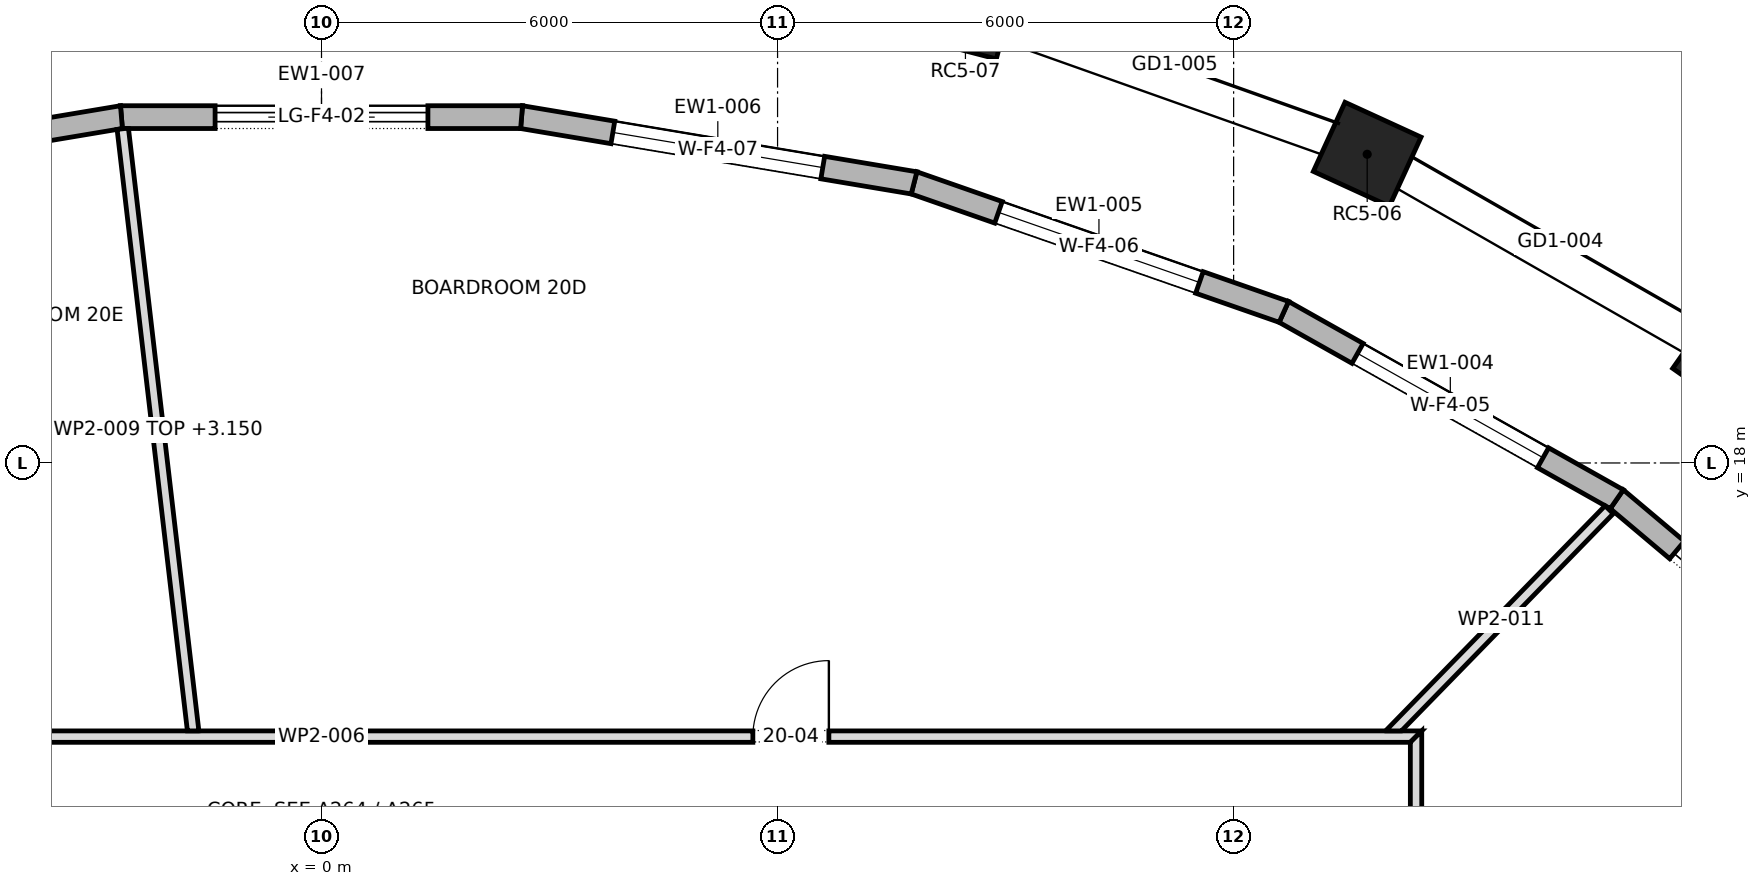
"""IFC4 building model, lengths in metres.
Left out: names, types, materials, properties, quantities, classifications, styles, units other than length and angle.
Written with IfcOpenShell. Run it as: python <this file> out.ifc"""

import sys

from ifc_helpers import new_model, si_unit, direction, frame, frame_2d, origin, origin_2d, place, context, subcontext, project, spatial, polyline, rectangle, outline, extrude, element, fill, save


model = new_model("IFC4")
c1 = context("Model", 3, precision=1e-05, world=origin(), true_north=direction((0.0, 1.0)))
c2 = subcontext(c1, "Body", "Model", "MODEL_VIEW")
j1 = project(units=[si_unit("LENGTHUNIT", "METRE"), si_unit("PLANEANGLEUNIT", "RADIAN")], contexts=[c1])
p1 = place(None, origin())
s1 = spatial("IfcSite", under=j1, at=p1, CompositionType="ELEMENT")
p2 = place(p1, origin())
s2 = spatial("IfcBuilding", under=s1, at=p2, CompositionType="ELEMENT")
p3 = place(p2, frame((0.0, 0.0, 288.3)))
s3 = spatial("IfcBuildingStorey", under=s2, at=p3, CompositionType="ELEMENT", Elevation=288.3)
for number, where, z_axis, x_axis in (
    (1, (18.514, 19.337, 0.0), (0.0, 0.0, 1.0), (-0.818, 0.575, 0.0)),
    (2, (13.757, 22.061, 0.0), (0.0, 0.0, 1.0), (-0.909, 0.417, 0.0)),
    (3, (8.472, 23.938, 0.0), (0.0, 0.0, 1.0), (-0.968, 0.252, 0.0)),
):
    element("IfcColumn", number, at=place(p3, frame(where, z_axis=z_axis, x_axis=x_axis)), inside=s3, PredefinedType="COLUMN", context=c2, shape_type="SweptSolid", body=[
        extrude(rectangle(XDim=1.1, YDim=1.0, at=origin_2d()), origin(), (0.0, 0.0, 1.0), 4.0),
    ])
p4 = place(p3, frame((20.768, 14.384, 0.0), z_axis=(0.0, 0.0, 1.0), x_axis=(-0.764876116592, 0.644177402792, 0.0)))
e4 = element("IfcWall", 4, at=p4, inside=s3, PredefinedType="STANDARD", context=c2, shape_type="SweptSolid", body=[
    extrude(outline(polyline([(-0.015, -0.15), (4.887, -0.15), (4.859, 0.15), (0.015, 0.15), (-0.015, -0.15)])), origin(), (0.0, 0.0, 1.0), 3.7),
])
p5 = place(p4, frame((1.036, 0.0, 0.0)))
e5 = element("IfcOpeningElement", 5, at=p5, cuts=e4, PredefinedType="OPENING", context=c2, shape_type="SweptSolid", body=[
    extrude(rectangle(XDim=2.8, YDim=3.25, at=frame_2d((1.4, 1.625))), frame((0.0, 0.162, 0.0), z_axis=(0.0, -1.0, 0.0), x_axis=(1.0, 0.0, 0.0)), (0.0, 0.0, 1.0), 0.324),
])
p6 = place(p3, frame((17.041, 17.523, 0.0), z_axis=(0.0, 0.0, 1.0), x_axis=(-0.871488606878, 0.490415750239, 0.0)))
e6 = element("IfcWall", 6, at=p6, inside=s3, PredefinedType="STANDARD", context=c2, shape_type="SweptSolid", body=[
    extrude(outline(polyline([(-0.014, -0.15), (5.039, -0.15), (5.013, 0.15), (0.014, 0.15), (-0.014, -0.15)])), origin(), (0.0, 0.0, 1.0), 3.7),
])
p7 = place(p6, frame((1.113, 0.0, 0.6)))
e7 = element("IfcOpeningElement", 7, at=p7, cuts=e6, PredefinedType="OPENING", context=c2, shape_type="SweptSolid", body=[
    extrude(rectangle(XDim=2.8, YDim=2.65, at=frame_2d((1.4, 1.325))), frame((0.0, 0.162, 0.0), z_axis=(0.0, -1.0, 0.0), x_axis=(1.0, 0.0, 0.0)), (0.0, 0.0, 1.0), 0.324),
])
p8 = place(p3, frame((12.661, 19.988, 0.0), z_axis=(0.0, 0.0, 1.0), x_axis=(-0.944204293701, 0.329360367617, 0.0)))
e8 = element("IfcWall", 8, at=p8, inside=s3, PredefinedType="STANDARD", context=c2, shape_type="SweptSolid", body=[
    extrude(outline(polyline([(-0.013, -0.15), (5.165, -0.15), (5.14, 0.15), (0.013, 0.15), (-0.013, -0.15)])), origin(), (0.0, 0.0, 1.0), 3.7),
])
p9 = place(p8, frame((1.176, 0.0, 0.6)))
e9 = element("IfcOpeningElement", 9, at=p9, cuts=e8, PredefinedType="OPENING", context=c2, shape_type="SweptSolid", body=[
    extrude(rectangle(XDim=2.8, YDim=2.65, at=frame_2d((1.4, 1.325))), frame((0.0, 0.162, 0.0), z_axis=(0.0, -1.0, 0.0), x_axis=(1.0, 0.0, 0.0)), (0.0, 0.0, 1.0), 0.324),
])
p10 = place(p3, frame((7.796, 21.685, 0.0), z_axis=(0.0, 0.0, 1.0), x_axis=(-0.986257472007, 0.165215613396, 0.0)))
e10 = element("IfcWall", 10, at=p10, inside=s3, PredefinedType="STANDARD", context=c2, shape_type="SweptSolid", body=[
    extrude(outline(polyline([(-0.013, -0.15), (5.248, -0.15), (5.223, 0.15), (0.013, 0.15), (-0.013, -0.15)])), origin(), (0.0, 0.0, 1.0), 3.7),
])
p11 = place(p10, frame((1.218, 0.0, 0.6)))
e11 = element("IfcOpeningElement", 11, at=p11, cuts=e10, PredefinedType="OPENING", context=c2, shape_type="SweptSolid", body=[
    extrude(rectangle(XDim=2.8, YDim=2.65, at=frame_2d((1.4, 1.325))), frame((0.0, 0.162, 0.0), z_axis=(0.0, -1.0, 0.0), x_axis=(1.0, 0.0, 0.0)), (0.0, 0.0, 1.0), 0.324),
])
p12 = place(p3, frame((2.632, 22.55, 0.0), z_axis=(0.0, 0.0, 1.0), x_axis=(-1.0, 0.0, 0.0)))
e12 = element("IfcWall", 12, at=p12, inside=s3, PredefinedType="STANDARD", context=c2, shape_type="SweptSolid", body=[
    extrude(outline(polyline([(-0.012, -0.15), (5.277, -0.15), (5.252, 0.15), (0.012, 0.15), (-0.012, -0.15)])), origin(), (0.0, 0.0, 1.0), 3.7),
])
p13 = place(p12, frame((1.232, 0.0, 0.0)))
e13 = element("IfcOpeningElement", 13, at=p13, cuts=e12, PredefinedType="OPENING", context=c2, shape_type="SweptSolid", body=[
    extrude(rectangle(XDim=2.8, YDim=3.25, at=frame_2d((1.4, 1.625))), frame((0.0, 0.162, 0.0), z_axis=(0.0, -1.0, 0.0), x_axis=(1.0, 0.0, 0.0)), (0.0, 0.0, 1.0), 0.324),
])
p14 = place(p3, frame((-2.632, 22.55, 0.0), z_axis=(0.0, 0.0, 1.0), x_axis=(-0.986257472007, -0.165215613396, 0.0)))
e14 = element("IfcWall", 14, at=p14, inside=s3, PredefinedType="STANDARD", context=c2, shape_type="SweptSolid", body=[
    extrude(outline(polyline([(-0.012, -0.15), (5.248, -0.15), (5.223, 0.15), (0.012, 0.15), (-0.012, -0.15)])), origin(), (0.0, 0.0, 1.0), 3.7),
])
p15 = place(p14, frame((1.218, 0.0, 0.6)))
e15 = element("IfcOpeningElement", 15, at=p15, cuts=e14, PredefinedType="OPENING", context=c2, shape_type="SweptSolid", body=[
    extrude(rectangle(XDim=2.8, YDim=2.65, at=frame_2d((1.4, 1.325))), frame((0.0, 0.162, 0.0), z_axis=(0.0, -1.0, 0.0), x_axis=(1.0, 0.0, 0.0)), (0.0, 0.0, 1.0), 0.324),
])
p16 = place(p3, frame((-14.475, 14.4, 0.0), z_axis=(0.0, 0.0, 1.0), x_axis=(1.0, 0.0, 0.0)))
e16 = element("IfcWall", 16, at=p16, inside=s3, PredefinedType="PARTITIONING", context=c2, shape_type="SweptSolid", body=[
    extrude(outline(polyline([(0.15, -0.075), (2.06, -0.075), (3.97, -0.075), (5.88, -0.075), (7.79, -0.075), (9.7, -0.075), (11.61, -0.075), (13.52, -0.075), (15.43, -0.075), (17.34, -0.075), (19.25, -0.075), (21.16, -0.075), (23.07, -0.075), (24.98, -0.075), (26.89, -0.075), (28.8, -0.075), (28.95, 0.075), (27.02, 0.075), (25.09, 0.075), (23.16, 0.075), (21.23, 0.075), (19.3, 0.075), (17.37, 0.075), (15.44, 0.075), (13.51, 0.075), (11.58, 0.075), (9.65, 0.075), (7.72, 0.075), (5.79, 0.075), (3.86, 0.075), (1.93, 0.075), (0.0, 0.075), (0.15, -0.075)])), origin(), (0.0, 0.0, 1.0), 3.7),
])
p17 = place(p16, frame((20.15, 0.0, 0.0)))
e17 = element("IfcOpeningElement", 17, at=p17, cuts=e16, PredefinedType="OPENING", context=c2, shape_type="SweptSolid", body=[
    extrude(rectangle(XDim=1.0, YDim=2.1, at=frame_2d((0.5, 1.05))), frame((0.0, 0.087, 0.0), z_axis=(0.0, -1.0, 0.0), x_axis=(1.0, 0.0, 0.0)), (0.0, 0.0, 1.0), 0.174),
])
p18 = place(p16, frame((8.565, 0.0, 0.0)))
e18 = element("IfcOpeningElement", 18, at=p18, cuts=e16, PredefinedType="OPENING", context=c2, shape_type="SweptSolid", body=[
    extrude(rectangle(XDim=1.0, YDim=2.1, at=frame_2d((0.5, 1.05))), frame((0.0, 0.087, 0.0), z_axis=(0.0, -1.0, 0.0), x_axis=(1.0, 0.0, 0.0)), (0.0, 0.0, 1.0), 0.174),
])
p19 = place(p16, frame((2.205, 0.0, 0.0)))
e19 = element("IfcOpeningElement", 19, at=p19, cuts=e16, PredefinedType="OPENING", context=c2, shape_type="SweptSolid", body=[
    extrude(rectangle(XDim=1.0, YDim=2.1, at=frame_2d((0.5, 1.05))), frame((0.0, 0.087, 0.0), z_axis=(0.0, -1.0, 0.0), x_axis=(1.0, 0.0, 0.0)), (0.0, 0.0, 1.0), 0.174),
])
p20 = place(p3, frame((-1.688, 14.467, 0.0), z_axis=(0.0, 0.0, 1.0), x_axis=(-0.116071250105, 0.993240889663, 0.0)))
e20 = element("IfcWall", 20, at=p20, inside=s3, PredefinedType="PARTITIONING", context=c2, shape_type="SweptSolid", body=[
    extrude(outline(polyline([(0.0, -0.075), (1.995, -0.075), (3.989, -0.075), (5.984, -0.075), (7.979, -0.075), (7.984, -0.025), (7.984, 0.075), (5.993, 0.075), (4.001, 0.075), (2.009, 0.075), (0.017, 0.075), (0.0, -0.073), (0.0, -0.075)])), origin(), (0.0, 0.0, 1.0), 3.15),
])
p21 = place(p3, frame((14.052, 14.423, 0.0), z_axis=(0.0, 0.0, 1.0), x_axis=(0.698170464683, 0.715931562542, 0.0)))
e21 = element("IfcWall", 21, at=p21, inside=s3, PredefinedType="PARTITIONING", context=c2, shape_type="SweptSolid", body=[
    extrude(outline(polyline([(4.137, -0.075), (4.137, 0.075), (4.137, 0.075), (2.758, 0.075), (1.379, 0.075), (0.0, 0.075), (0.0, 0.075), (0.146, -0.075), (2.142, -0.075), (4.137, -0.075)])), origin(), (0.0, 0.0, 1.0), 3.7),
])
p22 = place(p3, frame((14.4, -14.475, 0.0), z_axis=(0.0, 0.0, 1.0), x_axis=(0.0, 1.0, 0.0)))
e22 = element("IfcWall", 22, at=p22, inside=s3, PredefinedType="PARTITIONING", context=c2, shape_type="SweptSolid", body=[
    extrude(outline(polyline([(0.0, -0.075), (1.93, -0.075), (3.86, -0.075), (5.79, -0.075), (7.72, -0.075), (9.65, -0.075), (11.58, -0.075), (13.51, -0.075), (15.44, -0.075), (17.37, -0.075), (19.3, -0.075), (21.23, -0.075), (23.16, -0.075), (25.09, -0.075), (27.02, -0.075), (28.95, -0.075), (28.8, 0.075), (26.89, 0.075), (24.98, 0.075), (23.07, 0.075), (21.16, 0.075), (19.25, 0.075), (17.34, 0.075), (15.43, 0.075), (13.52, 0.075), (11.61, 0.075), (9.7, 0.075), (7.79, 0.075), (5.88, 0.075), (3.97, 0.075), (2.06, 0.075), (0.15, 0.075), (0.0, -0.075)])), origin(), (0.0, 0.0, 1.0), 3.7),
])
p23 = place(p22, frame((3.535, 0.0, 0.0)))
e23 = element("IfcOpeningElement", 23, at=p23, cuts=e22, PredefinedType="OPENING", context=c2, shape_type="SweptSolid", body=[
    extrude(rectangle(XDim=1.0, YDim=2.1, at=frame_2d((0.5, 1.05))), frame((0.0, 0.087, 0.0), z_axis=(0.0, -1.0, 0.0), x_axis=(1.0, 0.0, 0.0)), (0.0, 0.0, 1.0), 0.174),
])
p24 = place(p22, frame((10.14, 0.0, 0.0)))
e24 = element("IfcOpeningElement", 24, at=p24, cuts=e22, PredefinedType="OPENING", context=c2, shape_type="SweptSolid", body=[
    extrude(rectangle(XDim=1.0, YDim=2.1, at=frame_2d((0.5, 1.05))), frame((0.0, 0.087, 0.0), z_axis=(0.0, -1.0, 0.0), x_axis=(1.0, 0.0, 0.0)), (0.0, 0.0, 1.0), 0.174),
])
p25 = place(p22, frame((20.18, 0.0, 0.0)))
e25 = element("IfcOpeningElement", 25, at=p25, cuts=e22, PredefinedType="OPENING", context=c2, shape_type="SweptSolid", body=[
    extrude(rectangle(XDim=1.8, YDim=2.1, at=frame_2d((0.9, 1.05))), frame((0.0, 0.087, 0.0), z_axis=(0.0, -1.0, 0.0), x_axis=(1.0, 0.0, 0.0)), (0.0, 0.0, 1.0), 0.174),
])
p26 = place(p5, origin())
e26 = element("IfcDoor", 26, at=p26, inside=s3, OperationType="DOUBLE_DOOR_SLIDING", PredefinedType="DOOR", context=c2, shape_type="SweptSolid", body=[
    extrude(rectangle(XDim=2.8, YDim=3.25, at=frame_2d((1.4, 1.625))), frame((0.0, 0.025, 0.0), z_axis=(0.0, -1.0, 0.0), x_axis=(1.0, 0.0, 0.0)), (0.0, 0.0, 1.0), 0.05),
])
fill(e5, e26)
p27 = place(p7, origin())
e27 = element("IfcWindow", 27, at=p27, inside=s3, PartitioningType="DOUBLE_PANEL_VERTICAL", PredefinedType="WINDOW", context=c2, shape_type="SweptSolid", body=[
    extrude(rectangle(XDim=2.8, YDim=2.65, at=frame_2d((1.4, 1.325))), frame((0.0, 0.03, 0.0), z_axis=(0.0, -1.0, 0.0), x_axis=(1.0, 0.0, 0.0)), (0.0, 0.0, 1.0), 0.06),
])
fill(e7, e27)
p28 = place(p9, origin())
e28 = element("IfcWindow", 28, at=p28, inside=s3, PartitioningType="DOUBLE_PANEL_VERTICAL", PredefinedType="WINDOW", context=c2, shape_type="SweptSolid", body=[
    extrude(rectangle(XDim=2.8, YDim=2.65, at=frame_2d((1.4, 1.325))), frame((0.0, 0.03, 0.0), z_axis=(0.0, -1.0, 0.0), x_axis=(1.0, 0.0, 0.0)), (0.0, 0.0, 1.0), 0.06),
])
fill(e9, e28)
p29 = place(p11, origin())
e29 = element("IfcWindow", 29, at=p29, inside=s3, PartitioningType="DOUBLE_PANEL_VERTICAL", PredefinedType="WINDOW", context=c2, shape_type="SweptSolid", body=[
    extrude(rectangle(XDim=2.8, YDim=2.65, at=frame_2d((1.4, 1.325))), frame((0.0, 0.03, 0.0), z_axis=(0.0, -1.0, 0.0), x_axis=(1.0, 0.0, 0.0)), (0.0, 0.0, 1.0), 0.06),
])
fill(e11, e29)
p30 = place(p13, origin())
e30 = element("IfcDoor", 30, at=p30, inside=s3, OperationType="DOUBLE_DOOR_SLIDING", PredefinedType="DOOR", context=c2, shape_type="SweptSolid", body=[
    extrude(rectangle(XDim=2.8, YDim=3.25, at=frame_2d((1.4, 1.625))), frame((0.0, 0.025, 0.0), z_axis=(0.0, -1.0, 0.0), x_axis=(1.0, 0.0, 0.0)), (0.0, 0.0, 1.0), 0.05),
])
fill(e13, e30)
p31 = place(p17, origin())
e31 = element("IfcDoor", 31, at=p31, inside=s3, OperationType="SINGLE_SWING_LEFT", PredefinedType="DOOR", context=c2, shape_type="SweptSolid", body=[
    extrude(rectangle(XDim=1.0, YDim=2.1, at=frame_2d((0.5, 1.05))), frame((0.0, 0.025, 0.0), z_axis=(0.0, -1.0, 0.0), x_axis=(1.0, 0.0, 0.0)), (0.0, 0.0, 1.0), 0.05),
])
fill(e17, e31)
save(model, sys.argv[1])
